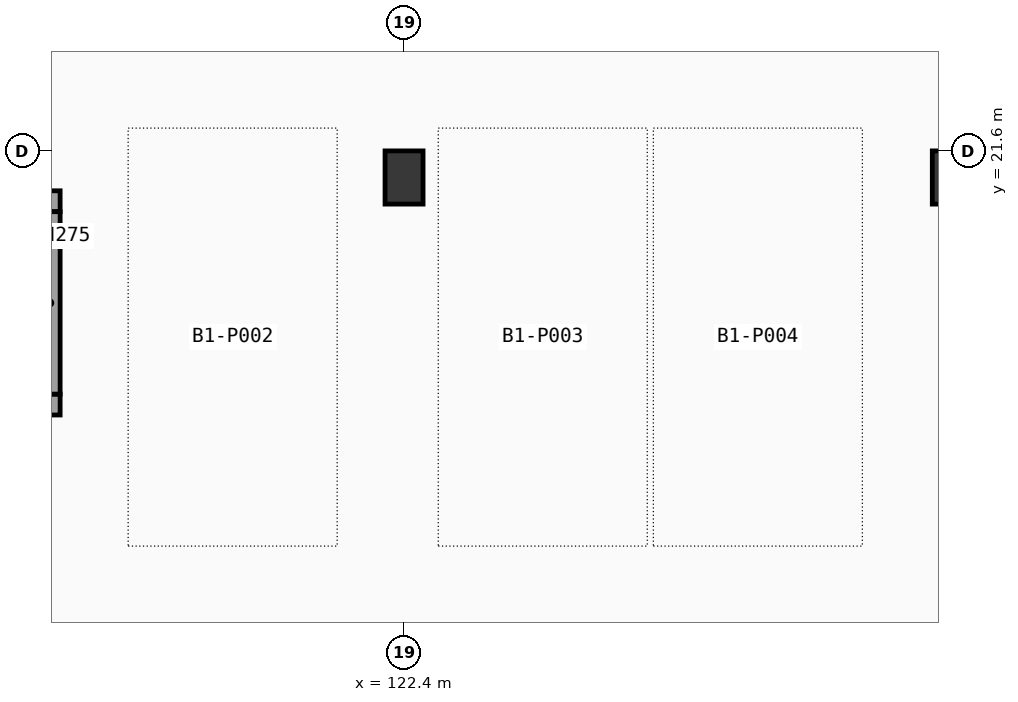
"""IFC4 building model, lengths in metres.
Left out: names, types, materials, properties, quantities, classifications, styles, units other than length and angle.
Written with IfcOpenShell. Run it as: python <this file> out.ifc"""

import sys

from ifc_helpers import new_model, si_unit, direction, frame, frame_2d, origin, origin_2d, place, context, subcontext, project, spatial, rectangle, extrude, element, save


model = new_model("IFC4")
c1 = context("Model", 3, precision=1e-05, world=origin(), true_north=direction((0.0, 1.0)))
c2 = subcontext(c1, "Body", "Model", "MODEL_VIEW")
j1 = project(units=[si_unit("LENGTHUNIT", "METRE"), si_unit("PLANEANGLEUNIT", "RADIAN")], contexts=[c1])
p1 = place(None, origin())
s1 = spatial("IfcSite", under=j1, at=p1, CompositionType="ELEMENT")
p2 = place(p1, origin())
s2 = spatial("IfcBuilding", under=s1, at=p2, CompositionType="ELEMENT")
p3 = place(p2, frame((0.0, 0.0, -4.2)))
s3 = spatial("IfcBuildingStorey", under=s2, at=p3, CompositionType="ELEMENT", Elevation=-4.2)
for number, where, z_axis, x_axis in (
    (1, (122.4, 21.25, 0.0), (0.0, 0.0, 1.0), (1.0, 0.0, 0.0)),
    (2, (129.6, 21.25, 0.0), (0.0, 0.0, 1.0), (1.0, 0.0, 0.0)),
):
    element("IfcColumn", number, at=place(p3, frame(where, z_axis=z_axis, x_axis=x_axis)), inside=s3, PredefinedType="COLUMN", context=c2, shape_type="SweptSolid", body=[
        extrude(rectangle(XDim=0.5, YDim=0.7, at=origin_2d()), origin(), (0.0, 0.0, 1.0), 4.2),
    ])
p4 = place(p3, frame((115.725, 18.262, 0.0), z_axis=(0.0, 0.0, 1.0), x_axis=(1.0, 0.0, 0.0)))
e3 = element("IfcWall", 3, at=p4, inside=s3, PredefinedType="SHEAR", context=c2, shape_type="SweptSolid", body=[
    extrude(rectangle(XDim=2.15, YDim=0.275, at=frame_2d((1.075, 0.0))), origin(), (0.0, 0.0, 1.0), 3.91),
])
p5 = place(p4, frame((0.525, 0.0, 0.0)))
e4 = element("IfcOpeningElement", 4, at=p5, cuts=e3, PredefinedType="OPENING", context=c2, shape_type="SweptSolid", body=[
    extrude(rectangle(XDim=1.1, YDim=2.15, at=frame_2d((0.55, 1.075))), frame((0.0, 0.147, 0.0), z_axis=(0.0, -1.0, 0.0), x_axis=(1.0, 0.0, 0.0)), (0.0, 0.0, 1.0), 0.295),
])
p6 = place(p3, frame((115.45, 20.938, 0.0), z_axis=(0.0, 0.0, 1.0), x_axis=(1.0, 0.0, 0.0)))
e5 = element("IfcWall", 5, at=p6, inside=s3, PredefinedType="SHEAR", context=c2, shape_type="SweptSolid", body=[
    extrude(rectangle(XDim=2.425, YDim=0.275, at=frame_2d((1.212, 0.0))), origin(), (0.0, 0.0, 1.0), 3.91),
])
p7 = place(p3, frame((117.738, 18.4, 0.0), z_axis=(0.0, 0.0, 1.0), x_axis=(0.0, 1.0, 0.0)))
e6 = element("IfcWall", 6, at=p7, inside=s3, PredefinedType="SHEAR", context=c2, shape_type="SweptSolid", body=[
    extrude(rectangle(XDim=2.4, YDim=0.275, at=frame_2d((1.2, 0.0))), origin(), (0.0, 0.0, 1.0), 3.91),
])
save(model, sys.argv[1])
